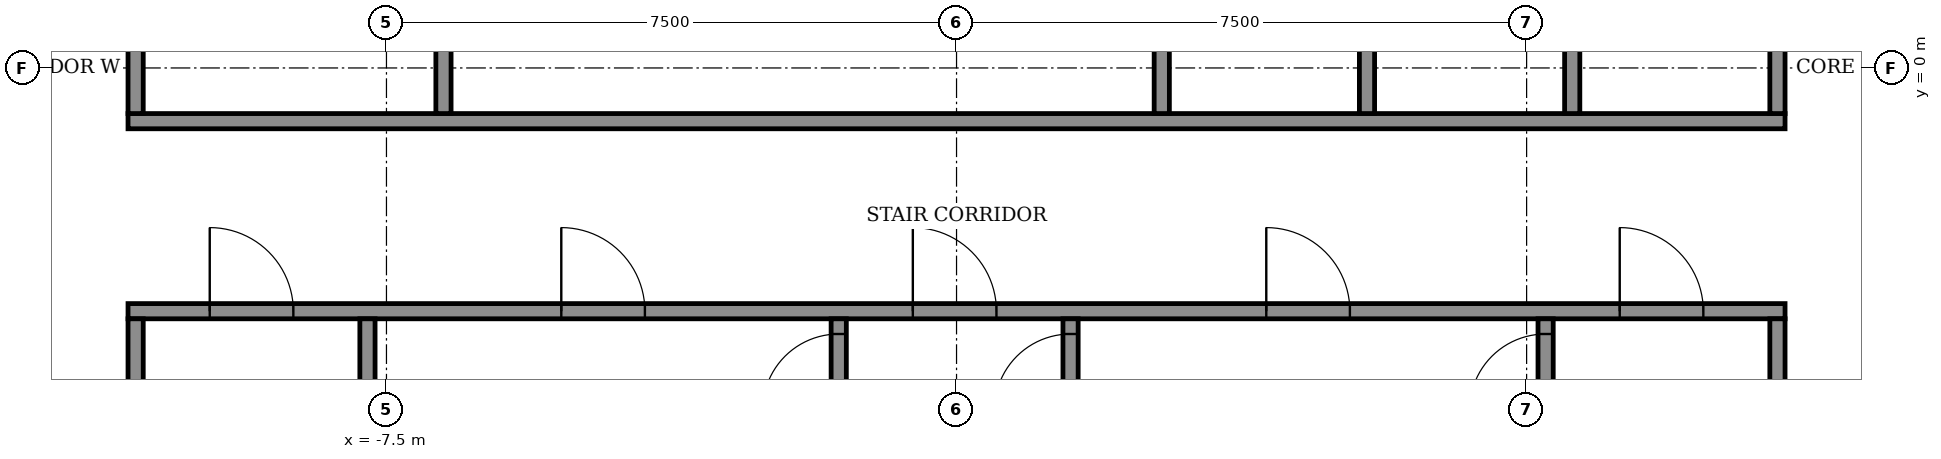
"""IFC4 building model, lengths in metres.
Left out: names, types, materials, properties, quantities, classifications, styles, units other than length and angle.
Written with IfcOpenShell. Run it as: python <this file> out.ifc"""

import sys

from ifc_helpers import new_model, si_unit, direction, frame, frame_2d, origin, place, context, subcontext, project, spatial, rectangle, extrude, element, fill, save


model = new_model("IFC4")
c1 = context("Model", 3, precision=1e-05, world=origin(), true_north=direction((0.0, 1.0)))
c2 = subcontext(c1, "Body", "Model", "MODEL_VIEW")
j1 = project(units=[si_unit("LENGTHUNIT", "METRE"), si_unit("PLANEANGLEUNIT", "RADIAN")], contexts=[c1])
p1 = place(None, origin())
s1 = spatial("IfcSite", under=j1, at=p1, CompositionType="ELEMENT")
p2 = place(p1, origin())
s2 = spatial("IfcBuilding", under=s1, at=p2, CompositionType="ELEMENT")
p3 = place(p2, frame((0.0, 0.0, 197.9)))
s3 = spatial("IfcBuildingStorey", under=s2, at=p3, CompositionType="ELEMENT", Elevation=197.9)
p4 = place(p3, frame((-10.9, -3.2, 0.0), z_axis=(0.0, 0.0, 1.0), x_axis=(1.0, 0.0, 0.0)))
e1 = element("IfcWall", 1, at=p4, inside=s3, PredefinedType="SHEAR", context=c2, shape_type="SweptSolid", body=[
    extrude(rectangle(XDim=21.8, YDim=0.2, at=frame_2d((10.9, 0.0))), origin(), (0.0, 0.0, 1.0), 3.05),
])
p5 = place(p4, frame((1.075, 0.0, 0.0)))
e2 = element("IfcOpeningElement", 2, at=p5, cuts=e1, PredefinedType="OPENING", context=c2, shape_type="SweptSolid", body=[
    extrude(rectangle(XDim=1.1, YDim=2.1, at=frame_2d((0.55, 1.05))), frame((0.0, 0.11, 0.0), z_axis=(0.0, -1.0, 0.0), x_axis=(1.0, 0.0, 0.0)), (0.0, 0.0, 1.0), 0.22),
])
p6 = place(p4, frame((10.325, 0.0, 0.0)))
e3 = element("IfcOpeningElement", 3, at=p6, cuts=e1, PredefinedType="OPENING", context=c2, shape_type="SweptSolid", body=[
    extrude(rectangle(XDim=1.1, YDim=2.1, at=frame_2d((0.55, 1.05))), frame((0.0, 0.11, 0.0), z_axis=(0.0, -1.0, 0.0), x_axis=(1.0, 0.0, 0.0)), (0.0, 0.0, 1.0), 0.22),
])
p7 = place(p4, frame((19.625, 0.0, 0.0)))
e4 = element("IfcOpeningElement", 4, at=p7, cuts=e1, PredefinedType="OPENING", context=c2, shape_type="SweptSolid", body=[
    extrude(rectangle(XDim=1.1, YDim=2.1, at=frame_2d((0.55, 1.05))), frame((0.0, 0.11, 0.0), z_axis=(0.0, -1.0, 0.0), x_axis=(1.0, 0.0, 0.0)), (0.0, 0.0, 1.0), 0.22),
])
p8 = place(p4, frame((5.7, 0.0, 0.0)))
e5 = element("IfcOpeningElement", 5, at=p8, cuts=e1, PredefinedType="OPENING", context=c2, shape_type="SweptSolid", body=[
    extrude(rectangle(XDim=1.1, YDim=2.1, at=frame_2d((0.55, 1.05))), frame((0.0, 0.11, 0.0), z_axis=(0.0, -1.0, 0.0), x_axis=(1.0, 0.0, 0.0)), (0.0, 0.0, 1.0), 0.22),
])
p9 = place(p4, frame((14.975, 0.0, 0.0)))
e6 = element("IfcOpeningElement", 6, at=p9, cuts=e1, PredefinedType="OPENING", context=c2, shape_type="SweptSolid", body=[
    extrude(rectangle(XDim=1.1, YDim=2.1, at=frame_2d((0.55, 1.05))), frame((0.0, 0.11, 0.0), z_axis=(0.0, -1.0, 0.0), x_axis=(1.0, 0.0, 0.0)), (0.0, 0.0, 1.0), 0.22),
])
p10 = place(p3, frame((-10.9, -0.7, 0.0), z_axis=(0.0, 0.0, 1.0), x_axis=(1.0, 0.0, 0.0)))
e7 = element("IfcWall", 7, at=p10, inside=s3, PredefinedType="SHEAR", context=c2, shape_type="SweptSolid", body=[
    extrude(rectangle(XDim=21.8, YDim=0.2, at=frame_2d((10.9, 0.0))), origin(), (0.0, 0.0, 1.0), 3.05),
])
for number, where, z_axis, x_axis in (
    (8, (-10.8, -10.8, 0.0), (0.0, 0.0, 1.0), (0.0, 1.0, 0.0)),
    (9, (-7.75, -10.8, 0.0), (0.0, 0.0, 1.0), (0.0, 1.0, 0.0)),
):
    element("IfcWall", number, at=place(p3, frame(where, z_axis=z_axis, x_axis=x_axis)), inside=s3, PredefinedType="SHEAR", context=c2, shape_type="SweptSolid", body=[
        extrude(rectangle(XDim=7.5, YDim=0.2, at=frame_2d((3.75, 0.0))), origin(), (0.0, 0.0, 1.0), 3.05),
    ])
p11 = place(p3, frame((-1.55, -10.8, 0.0), z_axis=(0.0, 0.0, 1.0), x_axis=(0.0, 1.0, 0.0)))
e10 = element("IfcWall", 10, at=p11, inside=s3, PredefinedType="SHEAR", context=c2, shape_type="SweptSolid", body=[
    extrude(rectangle(XDim=7.5, YDim=0.2, at=frame_2d((3.75, 0.0))), origin(), (0.0, 0.0, 1.0), 3.05),
])
p12 = place(p11, frame((6.3, 0.0, 0.0)))
e11 = element("IfcOpeningElement", 11, at=p12, cuts=e10, PredefinedType="OPENING", context=c2, shape_type="SweptSolid", body=[
    extrude(rectangle(XDim=1.0, YDim=2.1, at=frame_2d((0.5, 1.05))), frame((0.0, 0.11, 0.0), z_axis=(0.0, -1.0, 0.0), x_axis=(1.0, 0.0, 0.0)), (0.0, 0.0, 1.0), 0.22),
])
p13 = place(p3, frame((1.5, -10.8, 0.0), z_axis=(0.0, 0.0, 1.0), x_axis=(0.0, 1.0, 0.0)))
e12 = element("IfcWall", 12, at=p13, inside=s3, PredefinedType="SHEAR", context=c2, shape_type="SweptSolid", body=[
    extrude(rectangle(XDim=7.5, YDim=0.2, at=frame_2d((3.75, 0.0))), origin(), (0.0, 0.0, 1.0), 3.05),
])
p14 = place(p13, frame((6.3, 0.0, 0.0)))
e13 = element("IfcOpeningElement", 13, at=p14, cuts=e12, PredefinedType="OPENING", context=c2, shape_type="SweptSolid", body=[
    extrude(rectangle(XDim=1.0, YDim=2.1, at=frame_2d((0.5, 1.05))), frame((0.0, 0.11, 0.0), z_axis=(0.0, -1.0, 0.0), x_axis=(1.0, 0.0, 0.0)), (0.0, 0.0, 1.0), 0.22),
])
p15 = place(p3, frame((7.75, -10.8, 0.0), z_axis=(0.0, 0.0, 1.0), x_axis=(0.0, 1.0, 0.0)))
e14 = element("IfcWall", 14, at=p15, inside=s3, PredefinedType="SHEAR", context=c2, shape_type="SweptSolid", body=[
    extrude(rectangle(XDim=7.5, YDim=0.2, at=frame_2d((3.75, 0.0))), origin(), (0.0, 0.0, 1.0), 3.05),
])
p16 = place(p15, frame((6.3, 0.0, 0.0)))
e15 = element("IfcOpeningElement", 15, at=p16, cuts=e14, PredefinedType="OPENING", context=c2, shape_type="SweptSolid", body=[
    extrude(rectangle(XDim=1.0, YDim=2.1, at=frame_2d((0.5, 1.05))), frame((0.0, 0.11, 0.0), z_axis=(0.0, -1.0, 0.0), x_axis=(1.0, 0.0, 0.0)), (0.0, 0.0, 1.0), 0.22),
])
p17 = place(p3, frame((10.8, -10.8, 0.0), z_axis=(0.0, 0.0, 1.0), x_axis=(0.0, 1.0, 0.0)))
e16 = element("IfcWall", 16, at=p17, inside=s3, PredefinedType="SHEAR", context=c2, shape_type="SweptSolid", body=[
    extrude(rectangle(XDim=7.5, YDim=0.2, at=frame_2d((3.75, 0.0))), origin(), (0.0, 0.0, 1.0), 3.05),
])
for number, where, z_axis, x_axis in (
    (17, (-10.8, -0.6, 0.0), (0.0, 0.0, 1.0), (0.0, 1.0, 0.0)),
    (18, (-6.75, -0.6, 0.0), (0.0, 0.0, 1.0), (0.0, 1.0, 0.0)),
):
    element("IfcWall", number, at=place(p3, frame(where, z_axis=z_axis, x_axis=x_axis)), inside=s3, PredefinedType="STANDARD", context=c2, shape_type="SweptSolid", body=[
        extrude(rectangle(XDim=2.5, YDim=0.2, at=frame_2d((1.25, 0.0))), origin(), (0.0, 0.0, 1.0), 3.05),
    ])
for number, where, z_axis, x_axis in (
    (19, (2.7, -0.6, 0.0), (0.0, 0.0, 1.0), (0.0, 1.0, 0.0)),
    (20, (5.4, -0.6, 0.0), (0.0, 0.0, 1.0), (0.0, 1.0, 0.0)),
    (21, (8.1, -0.6, 0.0), (0.0, 0.0, 1.0), (0.0, 1.0, 0.0)),
    (22, (10.8, -0.6, 0.0), (0.0, 0.0, 1.0), (0.0, 1.0, 0.0)),
):
    element("IfcWall", number, at=place(p3, frame(where, z_axis=z_axis, x_axis=x_axis)), inside=s3, PredefinedType="SHEAR", context=c2, shape_type="SweptSolid", body=[
        extrude(rectangle(XDim=2.5, YDim=0.2, at=frame_2d((1.25, 0.0))), origin(), (0.0, 0.0, 1.0), 3.05),
    ])
p18 = place(p5, origin())
e23 = element("IfcDoor", 23, at=p18, inside=s3, OperationType="SINGLE_SWING_RIGHT", PredefinedType="DOOR", context=c2, shape_type="SweptSolid", body=[
    extrude(rectangle(XDim=1.1, YDim=2.1, at=frame_2d((0.55, 1.05))), frame((0.0, 0.025, 0.0), z_axis=(0.0, -1.0, 0.0), x_axis=(1.0, 0.0, 0.0)), (0.0, 0.0, 1.0), 0.05),
])
fill(e2, e23)
p19 = place(p6, origin())
e24 = element("IfcDoor", 24, at=p19, inside=s3, OperationType="SINGLE_SWING_RIGHT", PredefinedType="DOOR", context=c2, shape_type="SweptSolid", body=[
    extrude(rectangle(XDim=1.1, YDim=2.1, at=frame_2d((0.55, 1.05))), frame((0.0, 0.025, 0.0), z_axis=(0.0, -1.0, 0.0), x_axis=(1.0, 0.0, 0.0)), (0.0, 0.0, 1.0), 0.05),
])
fill(e3, e24)
p20 = place(p7, origin())
e25 = element("IfcDoor", 25, at=p20, inside=s3, OperationType="SINGLE_SWING_RIGHT", PredefinedType="DOOR", context=c2, shape_type="SweptSolid", body=[
    extrude(rectangle(XDim=1.1, YDim=2.1, at=frame_2d((0.55, 1.05))), frame((0.0, 0.025, 0.0), z_axis=(0.0, -1.0, 0.0), x_axis=(1.0, 0.0, 0.0)), (0.0, 0.0, 1.0), 0.05),
])
fill(e4, e25)
p21 = place(p8, origin())
e26 = element("IfcDoor", 26, at=p21, inside=s3, OperationType="SINGLE_SWING_LEFT", PredefinedType="DOOR", context=c2, shape_type="SweptSolid", body=[
    extrude(rectangle(XDim=1.1, YDim=2.1, at=frame_2d((0.55, 1.05))), frame((0.0, 0.025, 0.0), z_axis=(0.0, -1.0, 0.0), x_axis=(1.0, 0.0, 0.0)), (0.0, 0.0, 1.0), 0.05),
])
fill(e5, e26)
p22 = place(p9, origin())
e27 = element("IfcDoor", 27, at=p22, inside=s3, OperationType="SINGLE_SWING_LEFT", PredefinedType="DOOR", context=c2, shape_type="SweptSolid", body=[
    extrude(rectangle(XDim=1.1, YDim=2.1, at=frame_2d((0.55, 1.05))), frame((0.0, 0.025, 0.0), z_axis=(0.0, -1.0, 0.0), x_axis=(1.0, 0.0, 0.0)), (0.0, 0.0, 1.0), 0.05),
])
fill(e6, e27)
p23 = place(p12, origin())
e28 = element("IfcDoor", 28, at=p23, inside=s3, OperationType="SINGLE_SWING_RIGHT", PredefinedType="DOOR", context=c2, shape_type="SweptSolid", body=[
    extrude(rectangle(XDim=1.0, YDim=2.1, at=frame_2d((0.5, 1.05))), frame((0.0, 0.025, 0.0), z_axis=(0.0, -1.0, 0.0), x_axis=(1.0, 0.0, 0.0)), (0.0, 0.0, 1.0), 0.05),
])
fill(e11, e28)
p24 = place(p14, origin())
e29 = element("IfcDoor", 29, at=p24, inside=s3, OperationType="SINGLE_SWING_RIGHT", PredefinedType="DOOR", context=c2, shape_type="SweptSolid", body=[
    extrude(rectangle(XDim=1.0, YDim=2.1, at=frame_2d((0.5, 1.05))), frame((0.0, 0.025, 0.0), z_axis=(0.0, -1.0, 0.0), x_axis=(1.0, 0.0, 0.0)), (0.0, 0.0, 1.0), 0.05),
])
fill(e13, e29)
p25 = place(p16, origin())
e30 = element("IfcDoor", 30, at=p25, inside=s3, OperationType="SINGLE_SWING_RIGHT", PredefinedType="DOOR", context=c2, shape_type="SweptSolid", body=[
    extrude(rectangle(XDim=1.0, YDim=2.1, at=frame_2d((0.5, 1.05))), frame((0.0, 0.025, 0.0), z_axis=(0.0, -1.0, 0.0), x_axis=(1.0, 0.0, 0.0)), (0.0, 0.0, 1.0), 0.05),
])
fill(e15, e30)
save(model, sys.argv[1])
